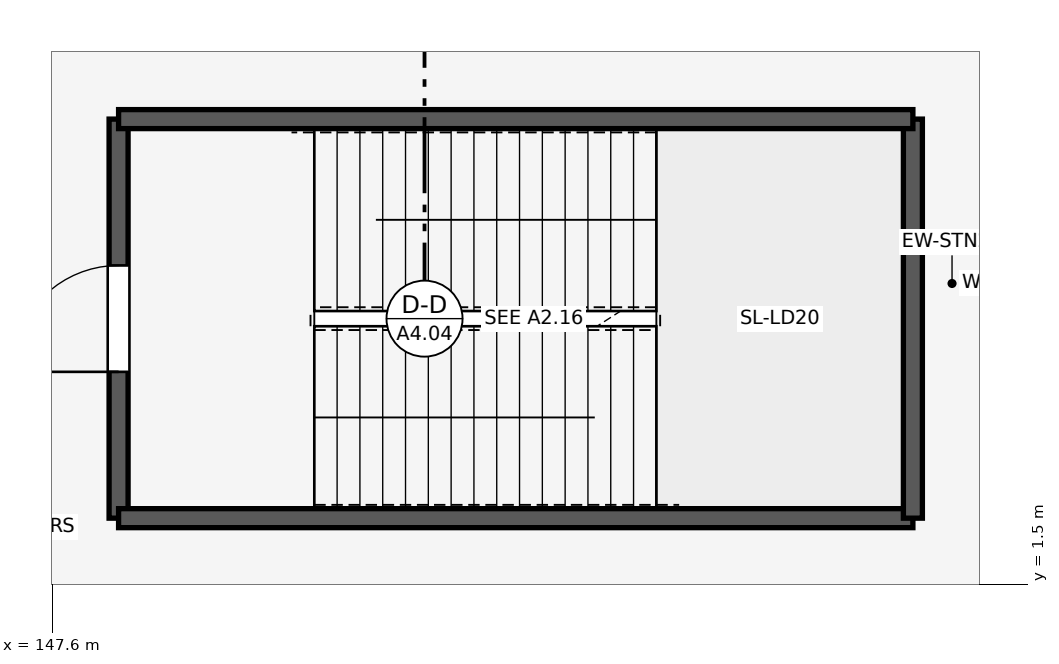
"""IFC4 building model, lengths in metres.
Left out: names, types, materials, properties, quantities, classifications, styles, units other than length and angle.
Written with IfcOpenShell. Run it as: python <this file> out.ifc"""

import sys

from ifc_helpers import new_model, si_unit, direction, frame, frame_2d, origin, place, context, subcontext, project, spatial, rectangle, extrude, element, fill, save


model = new_model("IFC4")
c1 = context("Model", 3, precision=1e-05, world=origin(), true_north=direction((0.0, 1.0)))
c2 = subcontext(c1, "Body", "Model", "MODEL_VIEW")
j1 = project(units=[si_unit("LENGTHUNIT", "METRE"), si_unit("PLANEANGLEUNIT", "RADIAN")], contexts=[c1])
p1 = place(None, origin())
s1 = spatial("IfcSite", under=j1, at=p1, CompositionType="ELEMENT")
p2 = place(p1, origin())
s2 = spatial("IfcBuilding", under=s1, at=p2, CompositionType="ELEMENT")
p3 = place(p2, frame((0.0, 0.0, 5.4)))
s3 = spatial("IfcBuildingStorey", under=s2, at=p3, CompositionType="ELEMENT", Elevation=5.4)
p4 = place(p3, frame((148.475, 7.625, 0.0), z_axis=(0.0, 0.0, 1.0), x_axis=(0.0, -1.0, 0.0)))
e1 = element("IfcWall", 1, at=p4, inside=s3, PredefinedType="SHEAR", context=c2, shape_type="SweptSolid", body=[
    extrude(rectangle(XDim=5.25, YDim=0.25, at=frame_2d((2.625, 0.0))), origin(), (0.0, 0.0, 1.0), 4.92),
])
p5 = place(p4, frame((1.925, 0.0, 0.0)))
e2 = element("IfcOpeningElement", 2, at=p5, cuts=e1, PredefinedType="OPENING", context=c2, shape_type="SweptSolid", body=[
    extrude(rectangle(XDim=1.4, YDim=2.2, at=frame_2d((0.7, 1.1))), frame((0.0, 0.135, 0.0), z_axis=(0.0, -1.0, 0.0), x_axis=(1.0, 0.0, 0.0)), (0.0, 0.0, 1.0), 0.27),
])
p6 = place(p3, frame((148.475, 2.375, 0.0), z_axis=(0.0, 0.0, 1.0), x_axis=(1.0, 0.0, 0.0)))
e3 = element("IfcWall", 3, at=p6, inside=s3, PredefinedType="SHEAR", context=c2, shape_type="SweptSolid", body=[
    extrude(rectangle(XDim=10.45, YDim=0.25, at=frame_2d((5.225, 0.0))), origin(), (0.0, 0.0, 1.0), 4.92),
])
p7 = place(p3, frame((158.925, 2.375, 0.0), z_axis=(0.0, 0.0, 1.0), x_axis=(0.0, 1.0, 0.0)))
e4 = element("IfcWall", 4, at=p7, inside=s3, PredefinedType="SHEAR", context=c2, shape_type="SweptSolid", body=[
    extrude(rectangle(XDim=5.25, YDim=0.25, at=frame_2d((2.625, 0.0))), origin(), (0.0, 0.0, 1.0), 4.92),
])
p8 = place(p3, frame((158.925, 7.625, 0.0), z_axis=(0.0, 0.0, 1.0), x_axis=(-1.0, 0.0, 0.0)))
e5 = element("IfcWall", 5, at=p8, inside=s3, PredefinedType="SHEAR", context=c2, shape_type="SweptSolid", body=[
    extrude(rectangle(XDim=10.45, YDim=0.25, at=frame_2d((5.225, 0.0))), origin(), (0.0, 0.0, 1.0), 4.92),
])
p9 = place(p5, frame((1.4, 0.0, 0.0), z_axis=(0.0, 0.0, 1.0), x_axis=(-1.0, 0.0, 0.0)))
e6 = element("IfcDoor", 6, at=p9, inside=s3, OperationType="SINGLE_SWING_LEFT", PredefinedType="DOOR", context=c2, shape_type="SweptSolid", body=[
    extrude(rectangle(XDim=1.4, YDim=2.2, at=frame_2d((0.7, 1.1))), frame((0.0, 0.025, 0.0), z_axis=(0.0, -1.0, 0.0), x_axis=(1.0, 0.0, 0.0)), (0.0, 0.0, 1.0), 0.05),
])
fill(e2, e6)
save(model, sys.argv[1])
